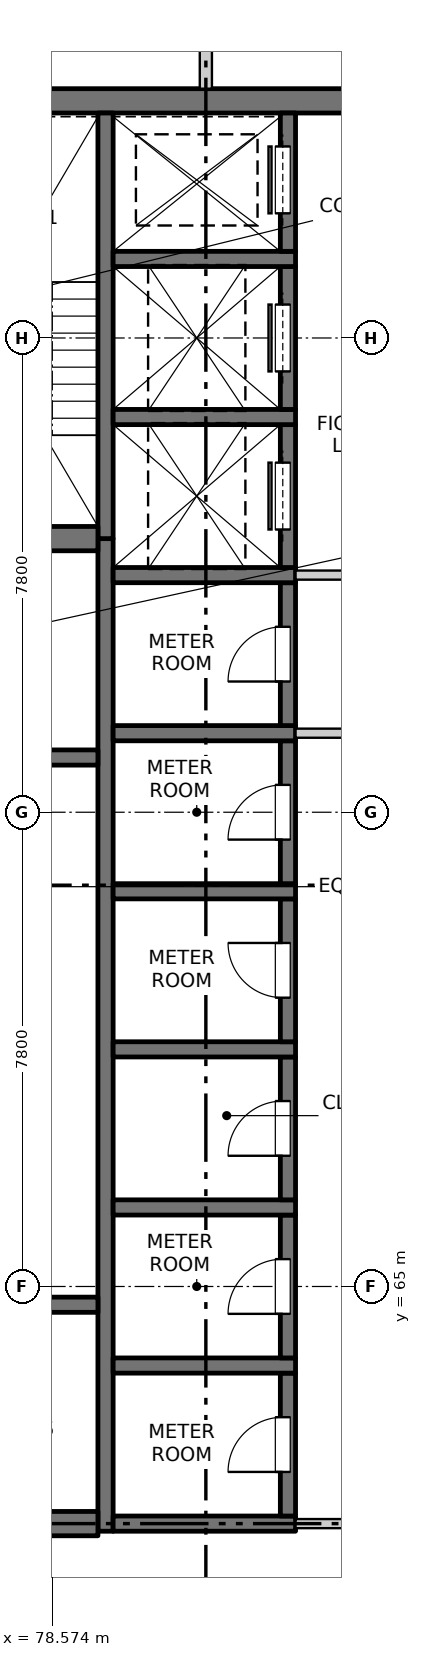
"""IFC4 building model, lengths in metres.
Left out: names, types, materials, properties, quantities, classifications, styles, units other than length and angle.
Written with IfcOpenShell. Run it as: python <this file> out.ifc"""

import sys

from ifc_helpers import new_model, si_unit, direction, frame, frame_2d, origin, place, context, subcontext, project, spatial, rectangle, extrude, element, fill, save


model = new_model("IFC4")
c1 = context("Model", 3, precision=1e-05, world=origin(), true_north=direction((0.0, 1.0)))
c2 = subcontext(c1, "Body", "Model", "MODEL_VIEW")
j1 = project(units=[si_unit("LENGTHUNIT", "METRE"), si_unit("PLANEANGLEUNIT", "RADIAN")], contexts=[c1])
p1 = place(None, origin())
s1 = spatial("IfcSite", under=j1, at=p1, CompositionType="ELEMENT")
p2 = place(p1, origin())
s2 = spatial("IfcBuilding", under=s1, at=p2, CompositionType="ELEMENT")
p3 = place(p2, frame((0.0, 0.0, 204.1)))
s3 = spatial("IfcBuildingStorey", under=s2, at=p3, CompositionType="ELEMENT", Elevation=204.1)
p4 = place(p3, frame((75.45, 84.5, -0.25), z_axis=(0.0, 0.0, 1.0), x_axis=(1.0, 0.0, 0.0)))
e1 = element("IfcWall", 1, at=p4, inside=s3, PredefinedType="SOLIDWALL", context=c2, shape_type="SweptSolid", body=[
    extrude(rectangle(XDim=19.1, YDim=0.4, at=frame_2d((9.55, 0.0))), origin(), (0.0, 0.0, 1.0), 3.4),
])
p5 = place(p3, frame((79.45, 60.975, -0.25), z_axis=(0.0, 0.0, 1.0), x_axis=(0.0, 1.0, 0.0)))
e2 = element("IfcWall", 2, at=p5, inside=s3, PredefinedType="SOLIDWALL", context=c2, shape_type="SweptSolid", body=[
    extrude(rectangle(XDim=16.325, YDim=0.25, at=frame_2d((8.163, 0.0))), origin(), (0.0, 0.0, 1.0), 3.4),
])
p6 = place(p3, frame((79.45, 77.3, -0.25), z_axis=(0.0, 0.0, 1.0), x_axis=(0.0, 1.0, 0.0)))
e3 = element("IfcWall", 3, at=p6, inside=s3, PredefinedType="SOLIDWALL", context=c2, shape_type="SweptSolid", body=[
    extrude(rectangle(XDim=7.0, YDim=0.25, at=frame_2d((3.5, 0.0))), origin(), (0.0, 0.0, 1.0), 3.4),
])
p7 = place(p3, frame((79.575, 61.1, -0.25), z_axis=(0.0, 0.0, 1.0), x_axis=(1.0, 0.0, 0.0)))
e4 = element("IfcWall", 4, at=p7, inside=s3, PredefinedType="SOLIDWALL", context=c2, shape_type="SweptSolid", body=[
    extrude(rectangle(XDim=3.0, YDim=0.25, at=frame_2d((1.5, 0.0))), origin(), (0.0, 0.0, 1.0), 3.4),
])
p8 = place(p3, frame((82.45, 61.225, -0.25), z_axis=(0.0, 0.0, 1.0), x_axis=(0.0, 1.0, 0.0)))
e5 = element("IfcWall", 5, at=p8, inside=s3, PredefinedType="SOLIDWALL", context=c2, shape_type="SweptSolid", body=[
    extrude(rectangle(XDim=2.35, YDim=0.25, at=frame_2d((1.175, 0.0))), origin(), (0.0, 0.0, 1.0), 3.4),
])
p9 = place(p8, frame((0.725, 0.0, 0.25)))
e6 = element("IfcOpeningElement", 6, at=p9, cuts=e5, PredefinedType="OPENING", context=c2, shape_type="SweptSolid", body=[
    extrude(rectangle(XDim=0.9, YDim=2.1, at=frame_2d((0.45, 1.05))), frame((0.0, 0.135, 0.0), z_axis=(0.0, -1.0, 0.0), x_axis=(1.0, 0.0, 0.0)), (0.0, 0.0, 1.0), 0.27),
])
p10 = place(p3, frame((79.575, 63.7, -0.25), z_axis=(0.0, 0.0, 1.0), x_axis=(1.0, 0.0, 0.0)))
e7 = element("IfcWall", 7, at=p10, inside=s3, PredefinedType="SOLIDWALL", context=c2, shape_type="SweptSolid", body=[
    extrude(rectangle(XDim=3.0, YDim=0.25, at=frame_2d((1.5, 0.0))), origin(), (0.0, 0.0, 1.0), 3.4),
])
p11 = place(p3, frame((82.45, 63.825, -0.25), z_axis=(0.0, 0.0, 1.0), x_axis=(0.0, 1.0, 0.0)))
e8 = element("IfcWall", 8, at=p11, inside=s3, PredefinedType="SOLIDWALL", context=c2, shape_type="SweptSolid", body=[
    extrude(rectangle(XDim=2.35, YDim=0.25, at=frame_2d((1.175, 0.0))), origin(), (0.0, 0.0, 1.0), 3.4),
])
p12 = place(p11, frame((0.725, 0.0, 0.25)))
e9 = element("IfcOpeningElement", 9, at=p12, cuts=e8, PredefinedType="OPENING", context=c2, shape_type="SweptSolid", body=[
    extrude(rectangle(XDim=0.9, YDim=2.1, at=frame_2d((0.45, 1.05))), frame((0.0, 0.135, 0.0), z_axis=(0.0, -1.0, 0.0), x_axis=(1.0, 0.0, 0.0)), (0.0, 0.0, 1.0), 0.27),
])
p13 = place(p3, frame((79.575, 66.3, -0.25), z_axis=(0.0, 0.0, 1.0), x_axis=(1.0, 0.0, 0.0)))
e10 = element("IfcWall", 10, at=p13, inside=s3, PredefinedType="SOLIDWALL", context=c2, shape_type="SweptSolid", body=[
    extrude(rectangle(XDim=3.0, YDim=0.25, at=frame_2d((1.5, 0.0))), origin(), (0.0, 0.0, 1.0), 3.4),
])
p14 = place(p3, frame((82.45, 66.425, -0.25), z_axis=(0.0, 0.0, 1.0), x_axis=(0.0, 1.0, 0.0)))
e11 = element("IfcWall", 11, at=p14, inside=s3, PredefinedType="SOLIDWALL", context=c2, shape_type="SweptSolid", body=[
    extrude(rectangle(XDim=2.35, YDim=0.25, at=frame_2d((1.175, 0.0))), origin(), (0.0, 0.0, 1.0), 3.4),
])
p15 = place(p14, frame((0.725, 0.0, 0.25)))
e12 = element("IfcOpeningElement", 12, at=p15, cuts=e11, PredefinedType="OPENING", context=c2, shape_type="SweptSolid", body=[
    extrude(rectangle(XDim=0.9, YDim=2.1, at=frame_2d((0.45, 1.05))), frame((0.0, 0.135, 0.0), z_axis=(0.0, -1.0, 0.0), x_axis=(1.0, 0.0, 0.0)), (0.0, 0.0, 1.0), 0.27),
])
p16 = place(p3, frame((79.575, 68.9, -0.25), z_axis=(0.0, 0.0, 1.0), x_axis=(1.0, 0.0, 0.0)))
e13 = element("IfcWall", 13, at=p16, inside=s3, PredefinedType="SOLIDWALL", context=c2, shape_type="SweptSolid", body=[
    extrude(rectangle(XDim=3.0, YDim=0.25, at=frame_2d((1.5, 0.0))), origin(), (0.0, 0.0, 1.0), 3.4),
])
p17 = place(p3, frame((82.45, 69.025, -0.25), z_axis=(0.0, 0.0, 1.0), x_axis=(0.0, 1.0, 0.0)))
e14 = element("IfcWall", 14, at=p17, inside=s3, PredefinedType="SOLIDWALL", context=c2, shape_type="SweptSolid", body=[
    extrude(rectangle(XDim=2.35, YDim=0.25, at=frame_2d((1.175, 0.0))), origin(), (0.0, 0.0, 1.0), 3.4),
])
p18 = place(p17, frame((0.725, 0.0, 0.25)))
e15 = element("IfcOpeningElement", 15, at=p18, cuts=e14, PredefinedType="OPENING", context=c2, shape_type="SweptSolid", body=[
    extrude(rectangle(XDim=0.9, YDim=2.1, at=frame_2d((0.45, 1.05))), frame((0.0, 0.135, 0.0), z_axis=(0.0, -1.0, 0.0), x_axis=(1.0, 0.0, 0.0)), (0.0, 0.0, 1.0), 0.27),
])
p19 = place(p3, frame((79.575, 71.5, -0.25), z_axis=(0.0, 0.0, 1.0), x_axis=(1.0, 0.0, 0.0)))
e16 = element("IfcWall", 16, at=p19, inside=s3, PredefinedType="SOLIDWALL", context=c2, shape_type="SweptSolid", body=[
    extrude(rectangle(XDim=3.0, YDim=0.25, at=frame_2d((1.5, 0.0))), origin(), (0.0, 0.0, 1.0), 3.4),
])
p20 = place(p3, frame((82.45, 71.625, -0.25), z_axis=(0.0, 0.0, 1.0), x_axis=(0.0, 1.0, 0.0)))
e17 = element("IfcWall", 17, at=p20, inside=s3, PredefinedType="SOLIDWALL", context=c2, shape_type="SweptSolid", body=[
    extrude(rectangle(XDim=2.35, YDim=0.25, at=frame_2d((1.175, 0.0))), origin(), (0.0, 0.0, 1.0), 3.4),
])
p21 = place(p20, frame((0.725, 0.0, 0.25)))
e18 = element("IfcOpeningElement", 18, at=p21, cuts=e17, PredefinedType="OPENING", context=c2, shape_type="SweptSolid", body=[
    extrude(rectangle(XDim=0.9, YDim=2.1, at=frame_2d((0.45, 1.05))), frame((0.0, 0.135, 0.0), z_axis=(0.0, -1.0, 0.0), x_axis=(1.0, 0.0, 0.0)), (0.0, 0.0, 1.0), 0.27),
])
p22 = place(p3, frame((79.575, 74.1, -0.25), z_axis=(0.0, 0.0, 1.0), x_axis=(1.0, 0.0, 0.0)))
e19 = element("IfcWall", 19, at=p22, inside=s3, PredefinedType="SOLIDWALL", context=c2, shape_type="SweptSolid", body=[
    extrude(rectangle(XDim=3.0, YDim=0.25, at=frame_2d((1.5, 0.0))), origin(), (0.0, 0.0, 1.0), 3.4),
])
p23 = place(p3, frame((82.45, 74.225, -0.25), z_axis=(0.0, 0.0, 1.0), x_axis=(0.0, 1.0, 0.0)))
e20 = element("IfcWall", 20, at=p23, inside=s3, PredefinedType="SOLIDWALL", context=c2, shape_type="SweptSolid", body=[
    extrude(rectangle(XDim=2.35, YDim=0.25, at=frame_2d((1.175, 0.0))), origin(), (0.0, 0.0, 1.0), 3.4),
])
p24 = place(p23, frame((0.725, 0.0, 0.25)))
e21 = element("IfcOpeningElement", 21, at=p24, cuts=e20, PredefinedType="OPENING", context=c2, shape_type="SweptSolid", body=[
    extrude(rectangle(XDim=0.9, YDim=2.1, at=frame_2d((0.45, 1.05))), frame((0.0, 0.135, 0.0), z_axis=(0.0, -1.0, 0.0), x_axis=(1.0, 0.0, 0.0)), (0.0, 0.0, 1.0), 0.27),
])
p25 = place(p3, frame((79.575, 76.7, -0.25), z_axis=(0.0, 0.0, 1.0), x_axis=(1.0, 0.0, 0.0)))
e22 = element("IfcWall", 22, at=p25, inside=s3, PredefinedType="SOLIDWALL", context=c2, shape_type="SweptSolid", body=[
    extrude(rectangle(XDim=3.0, YDim=0.25, at=frame_2d((1.5, 0.0))), origin(), (0.0, 0.0, 1.0), 3.4),
])
p26 = place(p3, frame((82.45, 76.825, -0.25), z_axis=(0.0, 0.0, 1.0), x_axis=(0.0, 1.0, 0.0)))
e23 = element("IfcWall", 23, at=p26, inside=s3, PredefinedType="SOLIDWALL", context=c2, shape_type="SweptSolid", body=[
    extrude(rectangle(XDim=2.35, YDim=0.25, at=frame_2d((1.175, 0.0))), origin(), (0.0, 0.0, 1.0), 3.4),
])
p27 = place(p26, frame((0.625, 0.0, 0.25)))
e24 = element("IfcOpeningElement", 24, at=p27, cuts=e23, PredefinedType="OPENING", context=c2, shape_type="SweptSolid", body=[
    extrude(rectangle(XDim=1.1, YDim=2.1, at=frame_2d((0.55, 1.05))), frame((0.0, 0.135, 0.0), z_axis=(0.0, -1.0, 0.0), x_axis=(1.0, 0.0, 0.0)), (0.0, 0.0, 1.0), 0.27),
])
p28 = place(p3, frame((79.575, 79.3, -0.25), z_axis=(0.0, 0.0, 1.0), x_axis=(1.0, 0.0, 0.0)))
e25 = element("IfcWall", 25, at=p28, inside=s3, PredefinedType="SOLIDWALL", context=c2, shape_type="SweptSolid", body=[
    extrude(rectangle(XDim=3.0, YDim=0.25, at=frame_2d((1.5, 0.0))), origin(), (0.0, 0.0, 1.0), 3.4),
])
p29 = place(p3, frame((82.45, 79.425, -0.25), z_axis=(0.0, 0.0, 1.0), x_axis=(0.0, 1.0, 0.0)))
e26 = element("IfcWall", 26, at=p29, inside=s3, PredefinedType="SOLIDWALL", context=c2, shape_type="SweptSolid", body=[
    extrude(rectangle(XDim=2.35, YDim=0.25, at=frame_2d((1.175, 0.0))), origin(), (0.0, 0.0, 1.0), 3.4),
])
p30 = place(p29, frame((0.625, 0.0, 0.25)))
e27 = element("IfcOpeningElement", 27, at=p30, cuts=e26, PredefinedType="OPENING", context=c2, shape_type="SweptSolid", body=[
    extrude(rectangle(XDim=1.1, YDim=2.1, at=frame_2d((0.55, 1.05))), frame((0.0, 0.135, 0.0), z_axis=(0.0, -1.0, 0.0), x_axis=(1.0, 0.0, 0.0)), (0.0, 0.0, 1.0), 0.27),
])
p31 = place(p3, frame((79.575, 81.9, -0.25), z_axis=(0.0, 0.0, 1.0), x_axis=(1.0, 0.0, 0.0)))
e28 = element("IfcWall", 28, at=p31, inside=s3, PredefinedType="SOLIDWALL", context=c2, shape_type="SweptSolid", body=[
    extrude(rectangle(XDim=3.0, YDim=0.25, at=frame_2d((1.5, 0.0))), origin(), (0.0, 0.0, 1.0), 3.4),
])
p32 = place(p3, frame((82.45, 82.025, -0.25), z_axis=(0.0, 0.0, 1.0), x_axis=(0.0, 1.0, 0.0)))
e29 = element("IfcWall", 29, at=p32, inside=s3, PredefinedType="SOLIDWALL", context=c2, shape_type="SweptSolid", body=[
    extrude(rectangle(XDim=2.275, YDim=0.25, at=frame_2d((1.138, 0.0))), origin(), (0.0, 0.0, 1.0), 3.4),
])
p33 = place(p32, frame((0.625, 0.0, 0.25)))
e30 = element("IfcOpeningElement", 30, at=p33, cuts=e29, PredefinedType="OPENING", context=c2, shape_type="SweptSolid", body=[
    extrude(rectangle(XDim=1.1, YDim=2.1, at=frame_2d((0.55, 1.05))), frame((0.0, 0.135, 0.0), z_axis=(0.0, -1.0, 0.0), x_axis=(1.0, 0.0, 0.0)), (0.0, 0.0, 1.0), 0.27),
])
p34 = place(p3, frame((75.45, 61.1, -0.25), z_axis=(0.0, 0.0, 1.0), x_axis=(1.0, 0.0, 0.0)))
e31 = element("IfcWall", 31, at=p34, inside=s3, PredefinedType="SOLIDWALL", context=c2, shape_type="SweptSolid", body=[
    extrude(rectangle(XDim=3.875, YDim=0.4, at=frame_2d((1.938, 0.0))), origin(), (0.0, 0.0, 1.0), 3.4),
])
for number, where, z_axis, x_axis in (
    (32, (75.45, 64.7, -0.25), (0.0, 0.0, 1.0), (1.0, 0.0, 0.0)),
    (33, (75.45, 73.7, -0.25), (0.0, 0.0, 1.0), (1.0, 0.0, 0.0)),
):
    element("IfcWall", number, at=place(p3, frame(where, z_axis=z_axis, x_axis=x_axis)), inside=s3, PredefinedType="SOLIDWALL", context=c2, shape_type="SweptSolid", body=[
        extrude(rectangle(XDim=3.875, YDim=0.25, at=frame_2d((1.938, 0.0))), origin(), (0.0, 0.0, 1.0), 3.4),
    ])
p35 = place(p3, frame((75.45, 77.3, -0.25), z_axis=(0.0, 0.0, 1.0), x_axis=(1.0, 0.0, 0.0)))
e34 = element("IfcWall", 34, at=p35, inside=s3, PredefinedType="SOLIDWALL", context=c2, shape_type="SweptSolid", body=[
    extrude(rectangle(XDim=3.875, YDim=0.4, at=frame_2d((1.938, 0.0))), origin(), (0.0, 0.0, 1.0), 3.4),
])
p36 = place(p3, frame((82.575, 61.1, 0.0), z_axis=(0.0, 0.0, 1.0), x_axis=(1.0, 0.0, 0.0)))
e35 = element("IfcWall", 35, at=p36, inside=s3, PredefinedType="PARTITIONING", context=c2, shape_type="SweptSolid", body=[
    extrude(rectangle(XDim=4.85, YDim=0.15, at=frame_2d((2.425, 0.0))), origin(), (0.0, 0.0, 1.0), 3.15),
])
p37 = place(p36, frame((1.525, 0.0, 0.0)))
e36 = element("IfcOpeningElement", 36, at=p37, cuts=e35, PredefinedType="OPENING", context=c2, shape_type="SweptSolid", body=[
    extrude(rectangle(XDim=1.8, YDim=2.1, at=frame_2d((0.9, 1.05))), frame((0.0, 0.085, 0.0), z_axis=(0.0, -1.0, 0.0), x_axis=(1.0, 0.0, 0.0)), (0.0, 0.0, 1.0), 0.17),
])
p38 = place(p3, frame((82.575, 74.1, 0.0), z_axis=(0.0, 0.0, 1.0), x_axis=(1.0, 0.0, 0.0)))
e37 = element("IfcWall", 37, at=p38, inside=s3, PredefinedType="PARTITIONING", context=c2, shape_type="SweptSolid", body=[
    extrude(rectangle(XDim=4.85, YDim=0.15, at=frame_2d((2.425, 0.0))), origin(), (0.0, 0.0, 1.0), 3.15),
])
p39 = place(p38, frame((1.525, 0.0, 0.0)))
e38 = element("IfcOpeningElement", 38, at=p39, cuts=e37, PredefinedType="OPENING", context=c2, shape_type="SweptSolid", body=[
    extrude(rectangle(XDim=1.8, YDim=2.1, at=frame_2d((0.9, 1.05))), frame((0.0, 0.085, 0.0), z_axis=(0.0, -1.0, 0.0), x_axis=(1.0, 0.0, 0.0)), (0.0, 0.0, 1.0), 0.17),
])
p40 = place(p3, frame((82.575, 76.7, 0.0), z_axis=(0.0, 0.0, 1.0), x_axis=(1.0, 0.0, 0.0)))
e39 = element("IfcWall", 39, at=p40, inside=s3, PredefinedType="PARTITIONING", context=c2, shape_type="SweptSolid", body=[
    extrude(rectangle(XDim=4.85, YDim=0.15, at=frame_2d((2.425, 0.0))), origin(), (0.0, 0.0, 1.0), 3.15),
])
p41 = place(p40, frame((1.525, 0.0, 0.0)))
e40 = element("IfcOpeningElement", 40, at=p41, cuts=e39, PredefinedType="OPENING", context=c2, shape_type="SweptSolid", body=[
    extrude(rectangle(XDim=1.8, YDim=2.1, at=frame_2d((0.9, 1.05))), frame((0.0, 0.085, 0.0), z_axis=(0.0, -1.0, 0.0), x_axis=(1.0, 0.0, 0.0)), (0.0, 0.0, 1.0), 0.17),
])
p42 = place(p3, frame((81.1, 84.7, 0.0), z_axis=(0.0, 0.0, 1.0), x_axis=(0.0, 1.0, 0.0)))
e41 = element("IfcWall", 41, at=p42, inside=s3, PredefinedType="PARTITIONING", context=c2, shape_type="SweptSolid", body=[
    extrude(rectangle(XDim=3.4, YDim=0.2, at=frame_2d((1.7, 0.0))), origin(), (0.0, 0.0, 1.0), 3.15),
])
p43 = place(p9, origin())
e42 = element("IfcDoor", 42, at=p43, inside=s3, OperationType="SINGLE_SWING_LEFT", PredefinedType="DOOR", context=c2, shape_type="SweptSolid", body=[
    extrude(rectangle(XDim=0.9, YDim=2.1, at=frame_2d((0.45, 1.05))), frame((0.0, 0.11, 0.0), z_axis=(0.0, -1.0, 0.0), x_axis=(1.0, 0.0, 0.0)), (0.0, 0.0, 1.0), 0.05),
])
fill(e6, e42)
p44 = place(p12, origin())
e43 = element("IfcDoor", 43, at=p44, inside=s3, OperationType="SINGLE_SWING_LEFT", PredefinedType="DOOR", context=c2, shape_type="SweptSolid", body=[
    extrude(rectangle(XDim=0.9, YDim=2.1, at=frame_2d((0.45, 1.05))), frame((0.0, 0.11, 0.0), z_axis=(0.0, -1.0, 0.0), x_axis=(1.0, 0.0, 0.0)), (0.0, 0.0, 1.0), 0.05),
])
fill(e9, e43)
p45 = place(p15, origin())
e44 = element("IfcDoor", 44, at=p45, inside=s3, OperationType="SINGLE_SWING_LEFT", PredefinedType="DOOR", context=c2, shape_type="SweptSolid", body=[
    extrude(rectangle(XDim=0.9, YDim=2.1, at=frame_2d((0.45, 1.05))), frame((0.0, 0.11, 0.0), z_axis=(0.0, -1.0, 0.0), x_axis=(1.0, 0.0, 0.0)), (0.0, 0.0, 1.0), 0.05),
])
fill(e12, e44)
p46 = place(p18, origin())
e45 = element("IfcDoor", 45, at=p46, inside=s3, OperationType="SINGLE_SWING_RIGHT", PredefinedType="DOOR", context=c2, shape_type="SweptSolid", body=[
    extrude(rectangle(XDim=0.9, YDim=2.1, at=frame_2d((0.45, 1.05))), frame((0.0, 0.11, 0.0), z_axis=(0.0, -1.0, 0.0), x_axis=(1.0, 0.0, 0.0)), (0.0, 0.0, 1.0), 0.05),
])
fill(e15, e45)
p47 = place(p21, origin())
e46 = element("IfcDoor", 46, at=p47, inside=s3, OperationType="SINGLE_SWING_LEFT", PredefinedType="DOOR", context=c2, shape_type="SweptSolid", body=[
    extrude(rectangle(XDim=0.9, YDim=2.1, at=frame_2d((0.45, 1.05))), frame((0.0, 0.11, 0.0), z_axis=(0.0, -1.0, 0.0), x_axis=(1.0, 0.0, 0.0)), (0.0, 0.0, 1.0), 0.05),
])
fill(e18, e46)
p48 = place(p24, origin())
e47 = element("IfcDoor", 47, at=p48, inside=s3, OperationType="SINGLE_SWING_LEFT", PredefinedType="DOOR", context=c2, shape_type="SweptSolid", body=[
    extrude(rectangle(XDim=0.9, YDim=2.1, at=frame_2d((0.45, 1.05))), frame((0.0, 0.11, 0.0), z_axis=(0.0, -1.0, 0.0), x_axis=(1.0, 0.0, 0.0)), (0.0, 0.0, 1.0), 0.05),
])
fill(e21, e47)
p49 = place(p27, origin())
e48 = element("IfcDoor", 48, at=p49, inside=s3, OperationType="SLIDING_TO_LEFT", PredefinedType="DOOR", context=c2, shape_type="SweptSolid", body=[
    extrude(rectangle(XDim=1.1, YDim=2.1, at=frame_2d((0.55, 1.05))), frame((0.0, 0.11, 0.0), z_axis=(0.0, -1.0, 0.0), x_axis=(1.0, 0.0, 0.0)), (0.0, 0.0, 1.0), 0.05),
])
fill(e24, e48)
p50 = place(p30, origin())
e49 = element("IfcDoor", 49, at=p50, inside=s3, OperationType="SLIDING_TO_LEFT", PredefinedType="DOOR", context=c2, shape_type="SweptSolid", body=[
    extrude(rectangle(XDim=1.1, YDim=2.1, at=frame_2d((0.55, 1.05))), frame((0.0, 0.11, 0.0), z_axis=(0.0, -1.0, 0.0), x_axis=(1.0, 0.0, 0.0)), (0.0, 0.0, 1.0), 0.05),
])
fill(e27, e49)
p51 = place(p33, origin())
e50 = element("IfcDoor", 50, at=p51, inside=s3, OperationType="SLIDING_TO_RIGHT", PredefinedType="DOOR", context=c2, shape_type="SweptSolid", body=[
    extrude(rectangle(XDim=1.1, YDim=2.1, at=frame_2d((0.55, 1.05))), frame((0.0, 0.11, 0.0), z_axis=(0.0, -1.0, 0.0), x_axis=(1.0, 0.0, 0.0)), (0.0, 0.0, 1.0), 0.05),
])
fill(e30, e50)
save(model, sys.argv[1])
